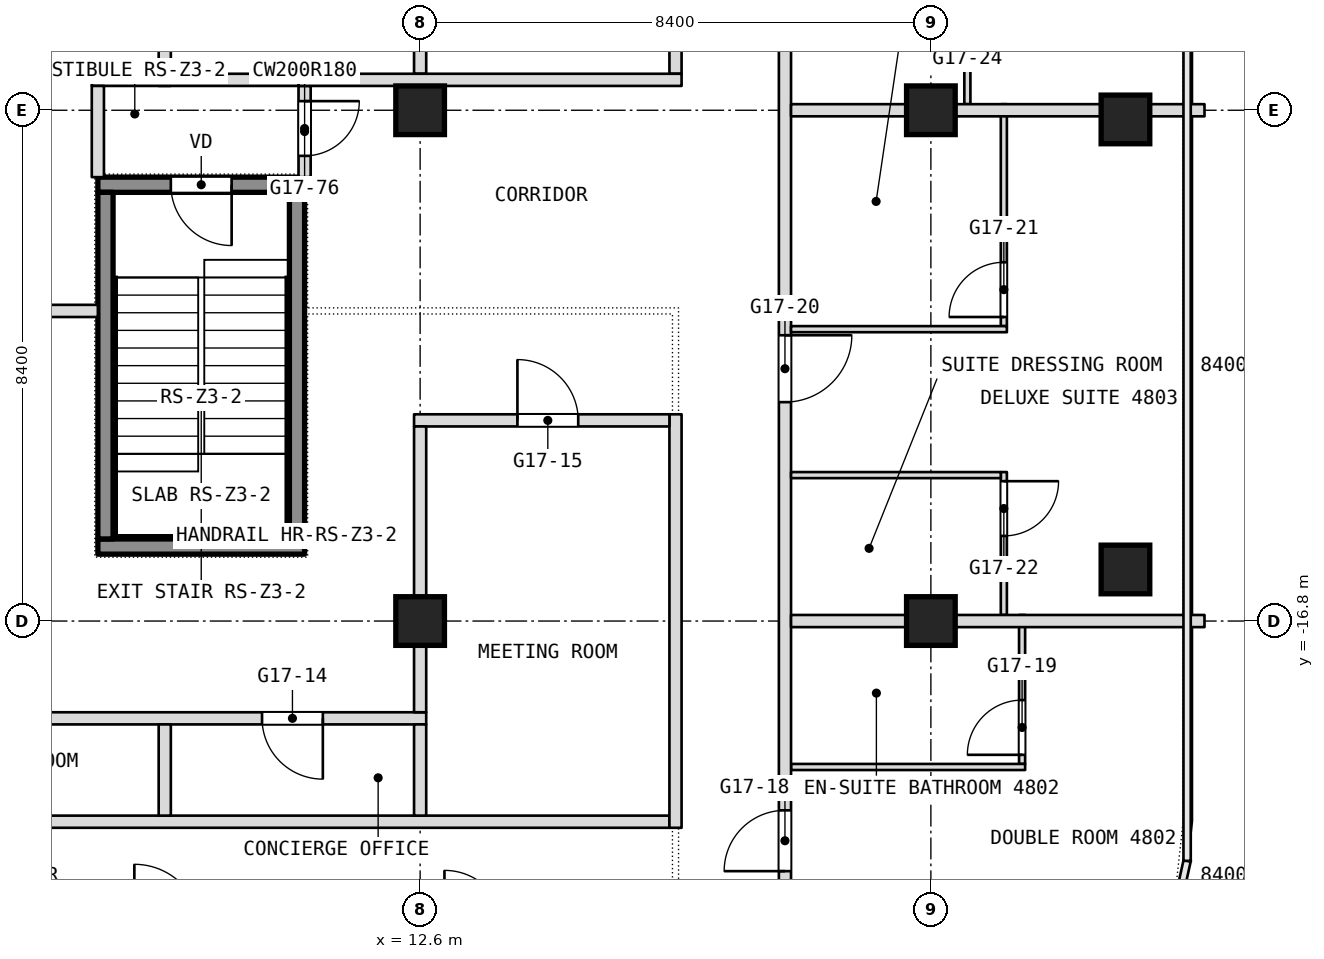
"""IFC4 building model, lengths in metres.
Left out: names, types, materials, properties, quantities, classifications, styles, units other than length and angle.
Written with IfcOpenShell. Run it as: python <this file> out.ifc"""

import sys

from ifc_helpers import new_model, si_unit, direction, frame, frame_2d, origin, origin_2d, place, context, subcontext, project, spatial, rectangle, extrude, element, fill, save


model = new_model("IFC4")
c1 = context("Model", 3, precision=1e-05, world=origin(), true_north=direction((0.0, 1.0)))
c2 = subcontext(c1, "Body", "Model", "MODEL_VIEW")
j1 = project(units=[si_unit("LENGTHUNIT", "METRE"), si_unit("PLANEANGLEUNIT", "RADIAN")], contexts=[c1])
p1 = place(None, origin())
s1 = spatial("IfcSite", under=j1, at=p1, CompositionType="ELEMENT")
p2 = place(p1, origin())
s2 = spatial("IfcBuilding", under=s1, at=p2, CompositionType="ELEMENT")
p3 = place(p2, frame((0.0, 0.0, 209.3)))
s3 = spatial("IfcBuildingStorey", under=s2, at=p3, CompositionType="ELEMENT", Elevation=209.3)
for number, where, z_axis, x_axis in (
    (1, (12.6, -16.8, 0.0), (0.0, 0.0, 1.0), (1.0, 0.0, 0.0)),
    (2, (12.6, -8.4, 0.0), (0.0, 0.0, 1.0), (1.0, 0.0, 0.0)),
    (3, (21.0, -16.8, 0.0), (0.0, 0.0, 1.0), (1.0, 0.0, 0.0)),
    (4, (21.0, -8.4, 0.0), (0.0, 0.0, 1.0), (1.0, 0.0, 0.0)),
    (5, (24.2, -8.551, 0.0), (0.0, 0.0, 1.0), (1.0, 0.0, 0.0)),
    (6, (24.2, -15.952, 0.0), (0.0, 0.0, 1.0), (1.0, 0.0, 0.0)),
):
    element("IfcColumn", number, at=place(p3, frame(where, z_axis=z_axis, x_axis=x_axis)), inside=s3, PredefinedType="COLUMN", context=c2, shape_type="SweptSolid", body=[
        extrude(rectangle(XDim=0.8, YDim=0.8, at=origin_2d()), origin(), (0.0, 0.0, 1.0), 3.6),
    ])
p4 = place(p3, frame((22.5, -19.15, 0.0), z_axis=(0.0, 0.0, 1.0), x_axis=(0.0, 1.0, 0.0)))
e7 = element("IfcWall", 7, at=p4, inside=s3, PredefinedType="PARTITIONING", context=c2, shape_type="SweptSolid", body=[
    extrude(rectangle(XDim=2.45, YDim=0.1, at=frame_2d((1.225, 0.0))), origin(), (0.0, 0.0, 1.0), 3.34),
])
p5 = place(p4, frame((0.15, 0.0, 0.0)))
e8 = element("IfcOpeningElement", 8, at=p5, cuts=e7, PredefinedType="OPENING", context=c2, shape_type="SweptSolid", body=[
    extrude(rectangle(XDim=0.9, YDim=2.1, at=frame_2d((0.45, 1.05))), frame((0.0, 0.05, 0.0), z_axis=(0.0, -1.0, 0.0), x_axis=(1.0, 0.0, 0.0)), (0.0, 0.0, 1.0), 0.1),
])
p6 = place(p3, frame((22.2, -16.7, 0.0), z_axis=(0.0, 0.0, 1.0), x_axis=(0.0, 1.0, 0.0)))
e9 = element("IfcWall", 9, at=p6, inside=s3, PredefinedType="PARTITIONING", context=c2, shape_type="SweptSolid", body=[
    extrude(rectangle(XDim=2.35, YDim=0.1, at=frame_2d((1.175, 0.0))), origin(), (0.0, 0.0, 1.0), 3.34),
])
p7 = place(p6, frame((1.3, 0.0, 0.0)))
e10 = element("IfcOpeningElement", 10, at=p7, cuts=e9, PredefinedType="OPENING", context=c2, shape_type="SweptSolid", body=[
    extrude(rectangle(XDim=0.9, YDim=2.1, at=frame_2d((0.45, 1.05))), frame((0.0, 0.05, 0.0), z_axis=(0.0, -1.0, 0.0), x_axis=(1.0, 0.0, 0.0)), (0.0, 0.0, 1.0), 0.1),
])
p8 = place(p3, frame((22.2, -11.95, 0.0), z_axis=(0.0, 0.0, 1.0), x_axis=(0.0, 1.0, 0.0)))
e11 = element("IfcWall", 11, at=p8, inside=s3, PredefinedType="PARTITIONING", context=c2, shape_type="SweptSolid", body=[
    extrude(rectangle(XDim=3.65, YDim=0.1, at=frame_2d((1.825, 0.0))), origin(), (0.0, 0.0, 1.0), 3.34),
])
p9 = place(p8, frame((0.15, 0.0, 0.0)))
e12 = element("IfcOpeningElement", 12, at=p9, cuts=e11, PredefinedType="OPENING", context=c2, shape_type="SweptSolid", body=[
    extrude(rectangle(XDim=0.9, YDim=2.1, at=frame_2d((0.45, 1.05))), frame((0.0, 0.05, 0.0), z_axis=(0.0, -1.0, 0.0), x_axis=(1.0, 0.0, 0.0)), (0.0, 0.0, 1.0), 0.1),
])
p10 = place(p3, frame((21.6, -8.3, 0.0), z_axis=(0.0, 0.0, 1.0), x_axis=(0.0, 1.0, 0.0)))
e13 = element("IfcWall", 13, at=p10, inside=s3, PredefinedType="PARTITIONING", context=c2, shape_type="SweptSolid", body=[
    extrude(rectangle(XDim=2.35, YDim=0.1, at=frame_2d((1.175, 0.0))), origin(), (0.0, 0.0, 1.0), 3.34),
])
p11 = place(p10, frame((1.3, 0.0, 0.0)))
e14 = element("IfcOpeningElement", 14, at=p11, cuts=e13, PredefinedType="OPENING", context=c2, shape_type="SweptSolid", body=[
    extrude(rectangle(XDim=0.9, YDim=2.1, at=frame_2d((0.45, 1.05))), frame((0.0, 0.05, 0.0), z_axis=(0.0, -1.0, 0.0), x_axis=(1.0, 0.0, 0.0)), (0.0, 0.0, 1.0), 0.1),
])
p12 = place(p3, frame((-4.1, -20.1, 0.0), z_axis=(0.0, 0.0, 1.0), x_axis=(1.0, 0.0, 0.0)))
e15 = element("IfcWall", 15, at=p12, inside=s3, PredefinedType="PARTITIONING", context=c2, shape_type="SweptSolid", body=[
    extrude(rectangle(XDim=20.8, YDim=0.2, at=frame_2d((10.4, 0.0))), origin(), (0.0, 0.0, 1.0), 3.34),
])
p13 = place(p3, frame((18.7, -19.2, 0.0), z_axis=(0.0, 0.0, 1.0), x_axis=(1.0, 0.0, 0.0)))
e16 = element("IfcWall", 16, at=p13, inside=s3, PredefinedType="PARTITIONING", context=c2, shape_type="SweptSolid", body=[
    extrude(rectangle(XDim=3.85, YDim=0.1, at=frame_2d((1.925, 0.0))), origin(), (0.0, 0.0, 1.0), 3.34),
])
p14 = place(p3, frame((18.6, -26.751, 0.0), z_axis=(0.0, 0.0, 1.0), x_axis=(0.0, 1.0, 0.0)))
e17 = element("IfcWall", 17, at=p14, inside=s3, PredefinedType="PARTITIONING", context=c2, shape_type="SweptSolid", body=[
    extrude(rectangle(XDim=49.091, YDim=0.2, at=frame_2d((24.545, 0.0))), origin(), (0.0, 0.0, 1.0), 3.34),
])
p15 = place(p14, frame((3.413, 0.0, 0.0)))
e18 = element("IfcOpeningElement", 18, at=p15, cuts=e17, PredefinedType="OPENING", context=c2, shape_type="SweptSolid", body=[
    extrude(rectangle(XDim=1.0, YDim=2.1, at=frame_2d((0.5, 1.05))), frame((0.0, 0.1, 0.0), z_axis=(0.0, -1.0, 0.0), x_axis=(1.0, 0.0, 0.0)), (0.0, 0.0, 1.0), 0.2),
])
p16 = place(p14, frame((5.838, 0.0, 0.0)))
e19 = element("IfcOpeningElement", 19, at=p16, cuts=e17, PredefinedType="OPENING", context=c2, shape_type="SweptSolid", body=[
    extrude(rectangle(XDim=1.0, YDim=2.1, at=frame_2d((0.5, 1.05))), frame((0.0, 0.1, 0.0), z_axis=(0.0, -1.0, 0.0), x_axis=(1.0, 0.0, 0.0)), (0.0, 0.0, 1.0), 0.2),
])
p17 = place(p14, frame((13.551, 0.0, 0.0)))
e20 = element("IfcOpeningElement", 20, at=p17, cuts=e17, PredefinedType="OPENING", context=c2, shape_type="SweptSolid", body=[
    extrude(rectangle(XDim=1.1, YDim=2.1, at=frame_2d((0.55, 1.05))), frame((0.0, 0.1, 0.0), z_axis=(0.0, -1.0, 0.0), x_axis=(1.0, 0.0, 0.0)), (0.0, 0.0, 1.0), 0.2),
])
p18 = place(p14, frame((21.151, 0.0, 0.0)))
e21 = element("IfcOpeningElement", 21, at=p18, cuts=e17, PredefinedType="OPENING", context=c2, shape_type="SweptSolid", body=[
    extrude(rectangle(XDim=1.0, YDim=2.1, at=frame_2d((0.5, 1.05))), frame((0.0, 0.1, 0.0), z_axis=(0.0, -1.0, 0.0), x_axis=(1.0, 0.0, 0.0)), (0.0, 0.0, 1.0), 0.2),
])
p19 = place(p14, frame((22.951, 0.0, 0.0)))
e22 = element("IfcOpeningElement", 22, at=p19, cuts=e17, PredefinedType="OPENING", context=c2, shape_type="SweptSolid", body=[
    extrude(rectangle(XDim=1.0, YDim=2.1, at=frame_2d((0.5, 1.05))), frame((0.0, 0.1, 0.0), z_axis=(0.0, -1.0, 0.0), x_axis=(1.0, 0.0, 0.0)), (0.0, 0.0, 1.0), 0.2),
])
p20 = place(p14, frame((30.351, 0.0, 0.0)))
e23 = element("IfcOpeningElement", 23, at=p20, cuts=e17, PredefinedType="OPENING", context=c2, shape_type="SweptSolid", body=[
    extrude(rectangle(XDim=1.1, YDim=2.1, at=frame_2d((0.55, 1.05))), frame((0.0, 0.1, 0.0), z_axis=(0.0, -1.0, 0.0), x_axis=(1.0, 0.0, 0.0)), (0.0, 0.0, 1.0), 0.2),
])
p21 = place(p14, frame((37.951, 0.0, 0.0)))
e24 = element("IfcOpeningElement", 24, at=p21, cuts=e17, PredefinedType="OPENING", context=c2, shape_type="SweptSolid", body=[
    extrude(rectangle(XDim=1.0, YDim=2.1, at=frame_2d((0.5, 1.05))), frame((0.0, 0.1, 0.0), z_axis=(0.0, -1.0, 0.0), x_axis=(1.0, 0.0, 0.0)), (0.0, 0.0, 1.0), 0.2),
])
p22 = place(p14, frame((39.751, 0.0, 0.0)))
e25 = element("IfcOpeningElement", 25, at=p22, cuts=e17, PredefinedType="OPENING", context=c2, shape_type="SweptSolid", body=[
    extrude(rectangle(XDim=1.0, YDim=2.1, at=frame_2d((0.5, 1.05))), frame((0.0, 0.1, 0.0), z_axis=(0.0, -1.0, 0.0), x_axis=(1.0, 0.0, 0.0)), (0.0, 0.0, 1.0), 0.2),
])
p23 = place(p14, frame((44.051, 0.0, 0.0)))
e26 = element("IfcOpeningElement", 26, at=p23, cuts=e17, PredefinedType="OPENING", context=c2, shape_type="SweptSolid", body=[
    extrude(rectangle(XDim=1.0, YDim=2.1, at=frame_2d((0.5, 1.05))), frame((0.0, 0.1, 0.0), z_axis=(0.0, -1.0, 0.0), x_axis=(1.0, 0.0, 0.0)), (0.0, 0.0, 1.0), 0.2),
])
p24 = place(p3, frame((5.7, -18.4, 0.0), z_axis=(0.0, 0.0, 1.0), x_axis=(1.0, 0.0, 0.0)))
e27 = element("IfcWall", 27, at=p24, inside=s3, PredefinedType="PARTITIONING", context=c2, shape_type="SweptSolid", body=[
    extrude(rectangle(XDim=7.0, YDim=0.2, at=frame_2d((3.5, 0.0))), origin(), (0.0, 0.0, 1.0), 3.34),
])
p25 = place(p24, frame((4.3, 0.0, 0.0)))
e28 = element("IfcOpeningElement", 28, at=p25, cuts=e27, PredefinedType="OPENING", context=c2, shape_type="SweptSolid", body=[
    extrude(rectangle(XDim=1.0, YDim=2.1, at=frame_2d((0.5, 1.05))), frame((0.0, 0.1, 0.0), z_axis=(0.0, -1.0, 0.0), x_axis=(1.0, 0.0, 0.0)), (0.0, 0.0, 1.0), 0.2),
])
p26 = place(p3, frame((16.8, -20.2, 0.0), z_axis=(0.0, 0.0, 1.0), x_axis=(0.0, 1.0, 0.0)))
e29 = element("IfcWall", 29, at=p26, inside=s3, PredefinedType="PARTITIONING", context=c2, shape_type="SweptSolid", body=[
    extrude(rectangle(XDim=6.8, YDim=0.2, at=frame_2d((3.4, 0.0))), origin(), (0.0, 0.0, 1.0), 3.34),
])
p27 = place(p3, frame((16.8, -7.8, 0.0), z_axis=(0.0, 0.0, 1.0), x_axis=(0.0, 1.0, 0.0)))
e30 = element("IfcWall", 30, at=p27, inside=s3, PredefinedType="PARTITIONING", context=c2, shape_type="SweptSolid", body=[
    extrude(rectangle(XDim=5.9, YDim=0.2, at=frame_2d((2.95, 0.0))), origin(), (0.0, 0.0, 1.0), 3.34),
])
p28 = place(p3, frame((18.7, -16.8, 0.0), z_axis=(0.0, 0.0, 1.0), x_axis=(1.0, 0.0, 0.0)))
e31 = element("IfcWall", 31, at=p28, inside=s3, PredefinedType="PARTITIONING", context=c2, shape_type="SweptSolid", body=[
    extrude(rectangle(XDim=6.8, YDim=0.2, at=frame_2d((3.4, 0.0))), origin(), (0.0, 0.0, 1.0), 2.94),
])
p29 = place(p3, frame((18.7, -14.4, 0.0), z_axis=(0.0, 0.0, 1.0), x_axis=(1.0, 0.0, 0.0)))
e32 = element("IfcWall", 32, at=p29, inside=s3, PredefinedType="PARTITIONING", context=c2, shape_type="SweptSolid", body=[
    extrude(rectangle(XDim=3.45, YDim=0.1, at=frame_2d((1.725, 0.0))), origin(), (0.0, 0.0, 1.0), 3.34),
])
p30 = place(p3, frame((12.5, -13.5, 0.0), z_axis=(0.0, 0.0, 1.0), x_axis=(1.0, 0.0, 0.0)))
e33 = element("IfcWall", 33, at=p30, inside=s3, PredefinedType="PARTITIONING", context=c2, shape_type="SweptSolid", body=[
    extrude(rectangle(XDim=4.2, YDim=0.2, at=frame_2d((2.1, 0.0))), origin(), (0.0, 0.0, 1.0), 3.34),
])
p31 = place(p30, frame((1.7, 0.0, 0.0)))
e34 = element("IfcOpeningElement", 34, at=p31, cuts=e33, PredefinedType="OPENING", context=c2, shape_type="SweptSolid", body=[
    extrude(rectangle(XDim=1.0, YDim=2.1, at=frame_2d((0.5, 1.05))), frame((0.0, 0.1, 0.0), z_axis=(0.0, -1.0, 0.0), x_axis=(1.0, 0.0, 0.0)), (0.0, 0.0, 1.0), 0.2),
])
p32 = place(p3, frame((12.6, -20.0, 0.0), z_axis=(0.0, 0.0, 1.0), x_axis=(0.0, 1.0, 0.0)))
e35 = element("IfcWall", 35, at=p32, inside=s3, PredefinedType="PARTITIONING", context=c2, shape_type="SweptSolid", body=[
    extrude(rectangle(XDim=1.5, YDim=0.2, at=frame_2d((0.75, 0.0))), origin(), (0.0, 0.0, 1.0), 3.34),
])
p33 = place(p3, frame((12.6, -7.8, 0.0), z_axis=(0.0, 0.0, 1.0), x_axis=(0.0, 1.0, 0.0)))
e36 = element("IfcWall", 36, at=p33, inside=s3, PredefinedType="PARTITIONING", context=c2, shape_type="SweptSolid", body=[
    extrude(rectangle(XDim=5.9, YDim=0.2, at=frame_2d((2.95, 0.0))), origin(), (0.0, 0.0, 1.0), 3.34),
])
p34 = place(p3, frame((12.6, -18.3, 0.0), z_axis=(0.0, 0.0, 1.0), x_axis=(0.0, 1.0, 0.0)))
e37 = element("IfcWall", 37, at=p34, inside=s3, PredefinedType="PARTITIONING", context=c2, shape_type="SweptSolid", body=[
    extrude(rectangle(XDim=4.7, YDim=0.2, at=frame_2d((2.35, 0.0))), origin(), (0.0, 0.0, 1.0), 3.34),
])
p35 = place(p3, frame((18.7, -12.0, 0.0), z_axis=(0.0, 0.0, 1.0), x_axis=(1.0, 0.0, 0.0)))
e38 = element("IfcWall", 38, at=p35, inside=s3, PredefinedType="PARTITIONING", context=c2, shape_type="SweptSolid", body=[
    extrude(rectangle(XDim=3.55, YDim=0.1, at=frame_2d((1.775, 0.0))), origin(), (0.0, 0.0, 1.0), 3.34),
])
p36 = place(p3, frame((-7.3, -11.7, 0.0), z_axis=(0.0, 0.0, 1.0), x_axis=(1.0, 0.0, 0.0)))
e39 = element("IfcWall", 39, at=p36, inside=s3, PredefinedType="PARTITIONING", context=c2, shape_type="SweptSolid", body=[
    extrude(rectangle(XDim=14.6, YDim=0.2, at=frame_2d((7.3, 0.0))), origin(), (0.0, 0.0, 1.0), 3.34),
])
p37 = place(p36, frame((4.7, 0.0, 0.0)))
e40 = element("IfcOpeningElement", 40, at=p37, cuts=e39, PredefinedType="OPENING", context=c2, shape_type="SweptSolid", body=[
    extrude(rectangle(XDim=1.0, YDim=2.1, at=frame_2d((0.5, 1.05))), frame((0.0, 0.1, 0.0), z_axis=(0.0, -1.0, 0.0), x_axis=(1.0, 0.0, 0.0)), (0.0, 0.0, 1.0), 0.2),
])
p38 = place(p36, frame((8.9, 0.0, 0.0)))
e41 = element("IfcOpeningElement", 41, at=p38, cuts=e39, PredefinedType="OPENING", context=c2, shape_type="SweptSolid", body=[
    extrude(rectangle(XDim=1.0, YDim=2.1, at=frame_2d((0.5, 1.05))), frame((0.0, 0.1, 0.0), z_axis=(0.0, -1.0, 0.0), x_axis=(1.0, 0.0, 0.0)), (0.0, 0.0, 1.0), 0.2),
])
p39 = place(p3, frame((10.7, -9.5, 0.0), z_axis=(0.0, 0.0, 1.0), x_axis=(0.0, 1.0, 0.0)))
e42 = element("IfcWall", 42, at=p39, inside=s3, PredefinedType="PARTITIONING", context=c2, shape_type="SweptSolid", body=[
    extrude(rectangle(XDim=1.5, YDim=0.2, at=frame_2d((0.75, 0.0))), origin(), (0.0, 0.0, 1.0), 3.34),
])
p40 = place(p39, frame((0.35, 0.0, 0.0)))
e43 = element("IfcOpeningElement", 43, at=p40, cuts=e42, PredefinedType="OPENING", context=c2, shape_type="SweptSolid", body=[
    extrude(rectangle(XDim=0.9, YDim=2.1, at=frame_2d((0.45, 1.05))), frame((0.0, 0.1, 0.0), z_axis=(0.0, -1.0, 0.0), x_axis=(1.0, 0.0, 0.0)), (0.0, 0.0, 1.0), 0.2),
])
p41 = place(p3, frame((8.4, -20.0, 0.0), z_axis=(0.0, 0.0, 1.0), x_axis=(0.0, 1.0, 0.0)))
e44 = element("IfcWall", 44, at=p41, inside=s3, PredefinedType="PARTITIONING", context=c2, shape_type="SweptSolid", body=[
    extrude(rectangle(XDim=1.5, YDim=0.2, at=frame_2d((0.75, 0.0))), origin(), (0.0, 0.0, 1.0), 3.34),
])
p42 = place(p3, frame((8.4, -8.0, 0.0), z_axis=(0.0, 0.0, 1.0), x_axis=(0.0, 1.0, 0.0)))
e45 = element("IfcWall", 45, at=p42, inside=s3, PredefinedType="PARTITIONING", context=c2, shape_type="SweptSolid", body=[
    extrude(rectangle(XDim=6.1, YDim=0.2, at=frame_2d((3.05, 0.0))), origin(), (0.0, 0.0, 1.0), 3.34),
])
p43 = place(p3, frame((18.7, -8.4, 0.0), z_axis=(0.0, 0.0, 1.0), x_axis=(1.0, 0.0, 0.0)))
e46 = element("IfcWall", 46, at=p43, inside=s3, PredefinedType="PARTITIONING", context=c2, shape_type="SweptSolid", body=[
    extrude(rectangle(XDim=6.8, YDim=0.2, at=frame_2d((3.4, 0.0))), origin(), (0.0, 0.0, 1.0), 2.94),
])
p44 = place(p3, frame((10.6, -7.9, 0.0), z_axis=(0.0, 0.0, 1.0), x_axis=(1.0, 0.0, 0.0)))
e47 = element("IfcWall", 47, at=p44, inside=s3, PredefinedType="PARTITIONING", context=c2, shape_type="SweptSolid", body=[
    extrude(rectangle(XDim=6.3, YDim=0.2, at=frame_2d((3.15, 0.0))), origin(), (0.0, 0.0, 1.0), 3.34),
])
p45 = place(p3, frame((7.2, -7.9, 0.0), z_axis=(0.0, 0.0, 1.0), x_axis=(1.0, 0.0, 0.0)))
e48 = element("IfcWall", 48, at=p45, inside=s3, PredefinedType="PARTITIONING", context=c2, shape_type="SweptSolid", body=[
    extrude(rectangle(XDim=3.4, YDim=0.2, at=frame_2d((1.7, 0.0))), origin(), (0.0, 0.0, 1.0), 3.34),
])
p46 = place(p3, frame((7.3, -9.5, 0.0), z_axis=(0.0, 0.0, 1.0), x_axis=(0.0, 1.0, 0.0)))
e49 = element("IfcWall", 49, at=p46, inside=s3, PredefinedType="PARTITIONING", context=c2, shape_type="SweptSolid", body=[
    extrude(rectangle(XDim=1.5, YDim=0.2, at=frame_2d((0.75, 0.0))), origin(), (0.0, 0.0, 1.0), 3.34),
])
p47 = place(p3, frame((7.3, -15.575, 0.1), z_axis=(0.0, 0.0, 1.0), x_axis=(1.0, 0.0, 0.0)))
e50 = element("IfcWall", 50, at=p47, inside=s3, PredefinedType="SHEAR", context=c2, shape_type="SweptSolid", body=[
    extrude(rectangle(XDim=3.4, YDim=0.25, at=frame_2d((1.7, 0.0))), origin(), (0.0, 0.0, 1.0), 3.6),
])
p48 = place(p3, frame((7.3, -9.625, 0.1), z_axis=(0.0, 0.0, 1.0), x_axis=(1.0, 0.0, 0.0)))
e51 = element("IfcWall", 51, at=p48, inside=s3, PredefinedType="SHEAR", context=c2, shape_type="SweptSolid", body=[
    extrude(rectangle(XDim=3.4, YDim=0.25, at=frame_2d((1.7, 0.0))), origin(), (0.0, 0.0, 1.0), 3.6),
])
p49 = place(p48, frame((1.2, 0.0, 0.0)))
e52 = element("IfcOpeningElement", 52, at=p49, cuts=e51, PredefinedType="OPENING", context=c2, shape_type="SweptSolid", body=[
    extrude(rectangle(XDim=1.0, YDim=2.1, at=frame_2d((0.5, 1.05))), frame((0.0, 0.125, 0.0), z_axis=(0.0, -1.0, 0.0), x_axis=(1.0, 0.0, 0.0)), (0.0, 0.0, 1.0), 0.25),
])
for number, where, z_axis, x_axis in (
    (53, (7.425, -15.45, 0.1), (0.0, 0.0, 1.0), (0.0, 1.0, 0.0)),
    (54, (10.575, -15.45, 0.1), (0.0, 0.0, 1.0), (0.0, 1.0, 0.0)),
):
    element("IfcWall", number, at=place(p3, frame(where, z_axis=z_axis, x_axis=x_axis)), inside=s3, PredefinedType="SHEAR", context=c2, shape_type="SweptSolid", body=[
        extrude(rectangle(XDim=5.7, YDim=0.25, at=frame_2d((2.85, 0.0))), origin(), (0.0, 0.0, 1.0), 3.6),
    ])
p50 = place(p5, origin())
e55 = element("IfcDoor", 55, at=p50, inside=s3, OperationType="SINGLE_SWING_LEFT", PredefinedType="DOOR", context=c2, shape_type="SweptSolid", body=[
    extrude(rectangle(XDim=0.9, YDim=2.1, at=frame_2d((0.45, 1.05))), frame((0.0, 0.025, 0.0), z_axis=(0.0, -1.0, 0.0), x_axis=(1.0, 0.0, 0.0)), (0.0, 0.0, 1.0), 0.05),
])
fill(e8, e55)
p51 = place(p7, origin())
e56 = element("IfcDoor", 56, at=p51, inside=s3, OperationType="SINGLE_SWING_RIGHT", PredefinedType="DOOR", context=c2, shape_type="SweptSolid", body=[
    extrude(rectangle(XDim=0.9, YDim=2.1, at=frame_2d((0.45, 1.05))), frame((0.0, 0.025, 0.0), z_axis=(0.0, -1.0, 0.0), x_axis=(1.0, 0.0, 0.0)), (0.0, 0.0, 1.0), 0.05),
])
fill(e10, e56)
p52 = place(p9, origin())
e57 = element("IfcDoor", 57, at=p52, inside=s3, OperationType="SINGLE_SWING_LEFT", PredefinedType="DOOR", context=c2, shape_type="SweptSolid", body=[
    extrude(rectangle(XDim=0.9, YDim=2.1, at=frame_2d((0.45, 1.05))), frame((0.0, 0.025, 0.0), z_axis=(0.0, -1.0, 0.0), x_axis=(1.0, 0.0, 0.0)), (0.0, 0.0, 1.0), 0.05),
])
fill(e12, e57)
p53 = place(p16, origin())
e58 = element("IfcDoor", 58, at=p53, inside=s3, OperationType="SINGLE_SWING_RIGHT", PredefinedType="DOOR", context=c2, shape_type="SweptSolid", body=[
    extrude(rectangle(XDim=1.0, YDim=2.1, at=frame_2d((0.5, 1.05))), frame((0.0, 0.025, 0.0), z_axis=(0.0, -1.0, 0.0), x_axis=(1.0, 0.0, 0.0)), (0.0, 0.0, 1.0), 0.05),
])
fill(e19, e58)
p54 = place(p17, origin())
e59 = element("IfcDoor", 59, at=p54, inside=s3, OperationType="SINGLE_SWING_LEFT", PredefinedType="DOOR", context=c2, shape_type="SweptSolid", body=[
    extrude(rectangle(XDim=1.1, YDim=2.1, at=frame_2d((0.55, 1.05))), frame((0.0, 0.025, 0.0), z_axis=(0.0, -1.0, 0.0), x_axis=(1.0, 0.0, 0.0)), (0.0, 0.0, 1.0), 0.05),
])
fill(e20, e59)
p55 = place(p25, origin())
e60 = element("IfcDoor", 60, at=p55, inside=s3, OperationType="SINGLE_SWING_LEFT", PredefinedType="DOOR", context=c2, shape_type="SweptSolid", body=[
    extrude(rectangle(XDim=1.0, YDim=2.1, at=frame_2d((0.5, 1.05))), frame((0.0, 0.025, 0.0), z_axis=(0.0, -1.0, 0.0), x_axis=(1.0, 0.0, 0.0)), (0.0, 0.0, 1.0), 0.05),
])
fill(e28, e60)
p56 = place(p31, origin())
e61 = element("IfcDoor", 61, at=p56, inside=s3, OperationType="SINGLE_SWING_LEFT", PredefinedType="DOOR", context=c2, shape_type="SweptSolid", body=[
    extrude(rectangle(XDim=1.0, YDim=2.1, at=frame_2d((0.5, 1.05))), frame((0.0, 0.025, 0.0), z_axis=(0.0, -1.0, 0.0), x_axis=(1.0, 0.0, 0.0)), (0.0, 0.0, 1.0), 0.05),
])
fill(e34, e61)
p57 = place(p40, origin())
e62 = element("IfcDoor", 62, at=p57, inside=s3, OperationType="SINGLE_SWING_RIGHT", PredefinedType="DOOR", context=c2, shape_type="SweptSolid", body=[
    extrude(rectangle(XDim=0.9, YDim=2.1, at=frame_2d((0.45, 1.05))), frame((0.0, 0.025, 0.0), z_axis=(0.0, -1.0, 0.0), x_axis=(1.0, 0.0, 0.0)), (0.0, 0.0, 1.0), 0.05),
])
fill(e43, e62)
p58 = place(p49, origin())
e63 = element("IfcDoor", 63, at=p58, inside=s3, OperationType="SINGLE_SWING_LEFT", PredefinedType="DOOR", context=c2, shape_type="SweptSolid", body=[
    extrude(rectangle(XDim=1.0, YDim=2.1, at=frame_2d((0.5, 1.05))), frame((0.0, 0.025, 0.0), z_axis=(0.0, -1.0, 0.0), x_axis=(1.0, 0.0, 0.0)), (0.0, 0.0, 1.0), 0.05),
])
fill(e52, e63)
save(model, sys.argv[1])
